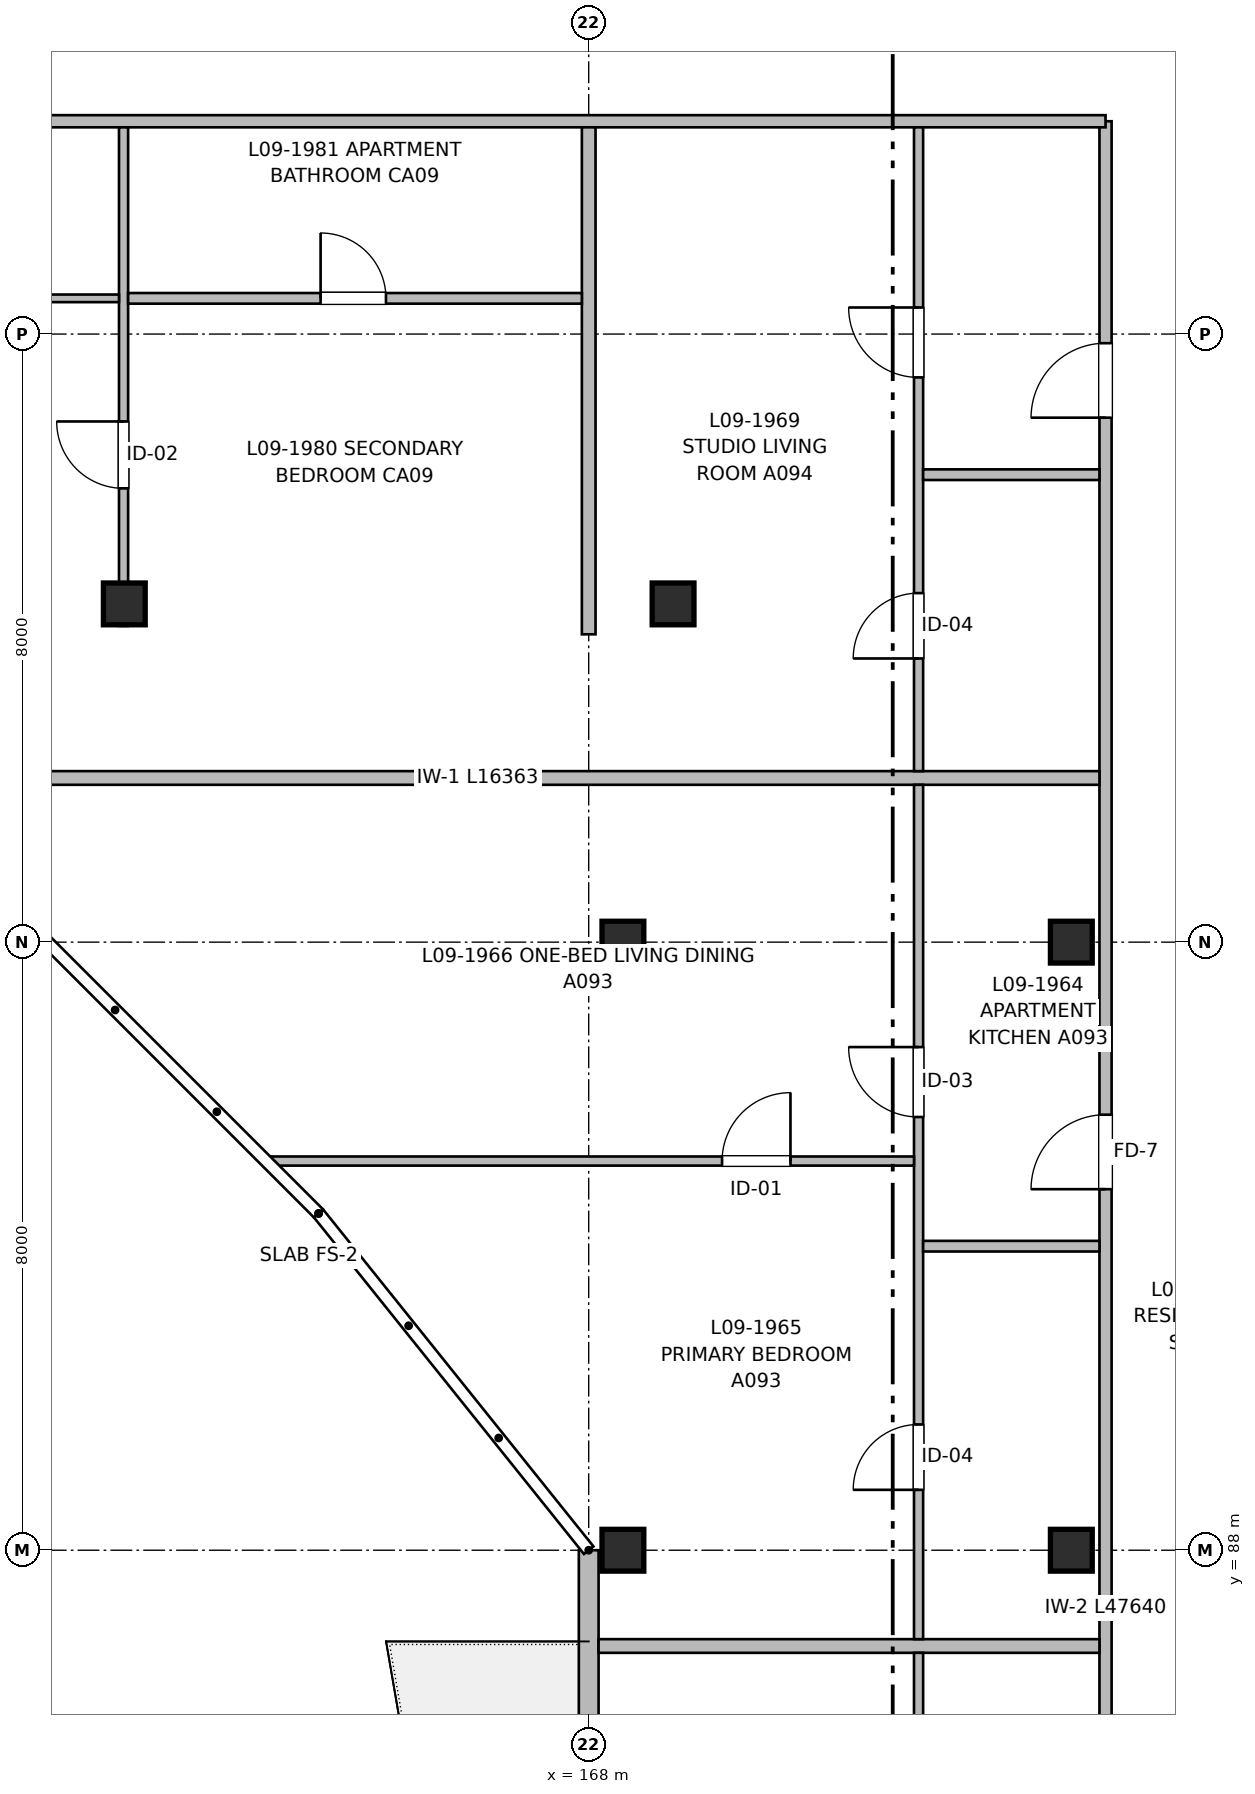
"""IFC4 building model, lengths in metres.
Left out: names, types, materials, properties, quantities, classifications, styles, units other than length and angle.
Written with IfcOpenShell. Run it as: python <this file> out.ifc"""

import sys

from ifc_helpers import new_model, si_unit, direction, frame, frame_2d, origin, origin_2d, place, context, subcontext, project, spatial, rectangle, extrude, element, fill, save


model = new_model("IFC4")
c1 = context("Model", 3, precision=1e-05, world=origin(), true_north=direction((0.0, 1.0)))
c2 = subcontext(c1, "Body", "Model", "MODEL_VIEW")
j1 = project(units=[si_unit("LENGTHUNIT", "METRE"), si_unit("PLANEANGLEUNIT", "RADIAN")], contexts=[c1])
p1 = place(None, origin())
s1 = spatial("IfcSite", under=j1, at=p1, CompositionType="ELEMENT")
p2 = place(p1, origin())
s2 = spatial("IfcBuilding", under=s1, at=p2, CompositionType="ELEMENT")
p3 = place(p2, frame((0.0, 0.0, 29.76)))
s3 = spatial("IfcBuildingStorey", under=s2, at=p3, CompositionType="ELEMENT", Elevation=29.76)
for number, where, z_axis, x_axis in (
    (1, (161.89, 100.45, 0.0), (0.0, 0.0, 1.0), (1.0, 0.0, 0.0)),
    (2, (168.45, 88.0, 0.0), (0.0, 0.0, 1.0), (1.0, 0.0, 0.0)),
    (3, (168.45, 96.0, 0.0), (0.0, 0.0, 1.0), (1.0, 0.0, 0.0)),
    (4, (169.11, 100.45, 0.0), (0.0, 0.0, 1.0), (1.0, 0.0, 0.0)),
    (5, (174.35, 88.0, 0.0), (0.0, 0.0, 1.0), (1.0, 0.0, 0.0)),
    (6, (174.35, 96.0, 0.0), (0.0, 0.0, 1.0), (1.0, 0.0, 0.0)),
):
    element("IfcColumn", number, at=place(p3, frame(where, z_axis=z_axis, x_axis=x_axis)), inside=s3, PredefinedType="COLUMN", context=c2, shape_type="SweptSolid", body=[
        extrude(rectangle(XDim=0.55, YDim=0.55, at=origin_2d()), origin(), (0.0, 0.0, 1.0), 3.2),
    ])
p4 = place(p3, frame((168.0, 59.0, 0.0), z_axis=(0.0, 0.0, 1.0), x_axis=(0.0, 1.0, 0.0)))
e7 = element("IfcWall", 7, at=p4, inside=s3, PredefinedType="SOLIDWALL", context=c2, shape_type="SweptSolid", body=[
    extrude(rectangle(XDim=29.0, YDim=0.26, at=frame_2d((14.5, 0.0))), origin(), (0.0, 0.0, 1.0), 2.98),
])
p5 = place(p4, frame((3.033, 0.0, 0.0)))
e8 = element("IfcOpeningElement", 8, at=p5, cuts=e7, PredefinedType="OPENING", context=c2, shape_type="SweptSolid", body=[
    extrude(rectangle(XDim=1.2, YDim=2.2, at=frame_2d((0.6, 1.1))), frame((0.0, 0.14, 0.0), z_axis=(0.0, -1.0, 0.0), x_axis=(1.0, 0.0, 0.0)), (0.0, 0.0, 1.0), 0.28),
])
p6 = place(p4, frame((6.133, 0.0, 0.77)))
e9 = element("IfcOpeningElement", 9, at=p6, cuts=e7, PredefinedType="OPENING", context=c2, shape_type="SweptSolid", body=[
    extrude(rectangle(XDim=1.65, YDim=1.45, at=frame_2d((0.825, 0.725))), frame((0.0, 0.14, 0.0), z_axis=(0.0, -1.0, 0.0), x_axis=(1.0, 0.0, 0.0)), (0.0, 0.0, 1.0), 0.28),
])
p7 = place(p4, frame((14.675, 0.0, 0.72)))
e10 = element("IfcOpeningElement", 10, at=p7, cuts=e7, PredefinedType="OPENING", context=c2, shape_type="SweptSolid", body=[
    extrude(rectangle(XDim=2.25, YDim=1.5, at=frame_2d((1.125, 0.75))), frame((0.0, 0.14, 0.0), z_axis=(0.0, -1.0, 0.0), x_axis=(1.0, 0.0, 0.0)), (0.0, 0.0, 1.0), 0.28),
])
p8 = place(p4, frame((24.092, 0.0, 0.9)))
e11 = element("IfcOpeningElement", 11, at=p8, cuts=e7, PredefinedType="OPENING", context=c2, shape_type="SweptSolid", body=[
    extrude(rectangle(XDim=1.05, YDim=1.15, at=frame_2d((0.525, 0.575))), frame((0.0, 0.14, 0.0), z_axis=(0.0, -1.0, 0.0), x_axis=(1.0, 0.0, 0.0)), (0.0, 0.0, 1.0), 0.28),
])
p9 = place(p4, frame((21.43, 0.0, 0.82)))
e12 = element("IfcOpeningElement", 12, at=p9, cuts=e7, PredefinedType="OPENING", context=c2, shape_type="SweptSolid", body=[
    extrude(rectangle(XDim=1.5, YDim=1.4, at=frame_2d((0.75, 0.7))), frame((0.0, 0.14, 0.0), z_axis=(0.0, -1.0, 0.0), x_axis=(1.0, 0.0, 0.0)), (0.0, 0.0, 1.0), 0.28),
])
p10 = place(p3, frame((174.8, 59.16, 0.0), z_axis=(0.0, 0.0, 1.0), x_axis=(0.0, 1.0, 0.0)))
e13 = element("IfcWall", 13, at=p10, inside=s3, PredefinedType="PARTITIONING", context=c2, shape_type="SweptSolid", body=[
    extrude(rectangle(XDim=47.64, YDim=0.16, at=frame_2d((23.82, 0.0))), origin(), (0.0, 0.0, 1.0), 2.935),
])
p11 = place(p10, frame((6.34, 0.0, 0.0)))
e14 = element("IfcOpeningElement", 14, at=p11, cuts=e13, PredefinedType="OPENING", context=c2, shape_type="SweptSolid", body=[
    extrude(rectangle(XDim=1.5, YDim=2.2, at=frame_2d((0.75, 1.1))), frame((0.0, 0.09, 0.0), z_axis=(0.0, -1.0, 0.0), x_axis=(1.0, 0.0, 0.0)), (0.0, 0.0, 1.0), 0.18),
])
p12 = place(p10, frame((21.55, 0.0, 0.0)))
e15 = element("IfcOpeningElement", 15, at=p12, cuts=e13, PredefinedType="OPENING", context=c2, shape_type="SweptSolid", body=[
    extrude(rectangle(XDim=1.02, YDim=2.15, at=frame_2d((0.51, 1.075))), frame((0.0, 0.09, 0.0), z_axis=(0.0, -1.0, 0.0), x_axis=(1.0, 0.0, 0.0)), (0.0, 0.0, 1.0), 0.18),
])
p13 = place(p10, frame((33.59, 0.0, 0.0)))
e16 = element("IfcOpeningElement", 16, at=p13, cuts=e13, PredefinedType="OPENING", context=c2, shape_type="SweptSolid", body=[
    extrude(rectangle(XDim=0.98, YDim=2.15, at=frame_2d((0.49, 1.075))), frame((0.0, 0.09, 0.0), z_axis=(0.0, -1.0, 0.0), x_axis=(1.0, 0.0, 0.0)), (0.0, 0.0, 1.0), 0.18),
])
p14 = place(p10, frame((43.74, 0.0, 0.0)))
e17 = element("IfcOpeningElement", 17, at=p14, cuts=e13, PredefinedType="OPENING", context=c2, shape_type="SweptSolid", body=[
    extrude(rectangle(XDim=0.98, YDim=2.15, at=frame_2d((0.49, 1.075))), frame((0.0, 0.09, 0.0), z_axis=(0.0, -1.0, 0.0), x_axis=(1.0, 0.0, 0.0)), (0.0, 0.0, 1.0), 0.18),
])
p15 = place(p3, frame((147.16, 106.8, 0.0), z_axis=(0.0, 0.0, 1.0), x_axis=(1.0, 0.0, 0.0)))
e18 = element("IfcWall", 18, at=p15, inside=s3, PredefinedType="PARTITIONING", context=c2, shape_type="SweptSolid", body=[
    extrude(rectangle(XDim=27.64, YDim=0.16, at=frame_2d((13.82, 0.0))), origin(), (0.0, 0.0, 1.0), 2.935),
])
p16 = place(p15, frame((3.515, 0.0, 0.0)))
e19 = element("IfcOpeningElement", 19, at=p16, cuts=e18, PredefinedType="OPENING", context=c2, shape_type="SweptSolid", body=[
    extrude(rectangle(XDim=1.05, YDim=2.15, at=frame_2d((0.525, 1.075))), frame((0.0, 0.09, 0.0), z_axis=(0.0, -1.0, 0.0), x_axis=(1.0, 0.0, 0.0)), (0.0, 0.0, 1.0), 0.18),
])
p17 = place(p15, frame((10.69, 0.0, 0.0)))
e20 = element("IfcOpeningElement", 20, at=p17, cuts=e18, PredefinedType="OPENING", context=c2, shape_type="SweptSolid", body=[
    extrude(rectangle(XDim=0.98, YDim=2.15, at=frame_2d((0.49, 1.075))), frame((0.0, 0.09, 0.0), z_axis=(0.0, -1.0, 0.0), x_axis=(1.0, 0.0, 0.0)), (0.0, 0.0, 1.0), 0.18),
])
p18 = place(p3, frame((168.0, 100.05, 0.0), z_axis=(0.0, 0.0, 1.0), x_axis=(0.0, 1.0, 0.0)))
e21 = element("IfcWall", 21, at=p18, inside=s3, PredefinedType="PARTITIONING", context=c2, shape_type="SweptSolid", body=[
    extrude(rectangle(XDim=6.67, YDim=0.18, at=frame_2d((3.335, 0.0))), origin(), (0.0, 0.0, 1.0), 2.935),
])
p19 = place(p3, frame((168.13, 86.74, 0.0), z_axis=(0.0, 0.0, 1.0), x_axis=(1.0, 0.0, 0.0)))
e22 = element("IfcWall", 22, at=p19, inside=s3, PredefinedType="PARTITIONING", context=c2, shape_type="SweptSolid", body=[
    extrude(rectangle(XDim=6.59, YDim=0.18, at=frame_2d((3.295, 0.0))), origin(), (0.0, 0.0, 1.0), 2.935),
])
p20 = place(p3, frame((158.357, 98.16, 0.0), z_axis=(0.0, 0.0, 1.0), x_axis=(1.0, 0.0, 0.0)))
e23 = element("IfcWall", 23, at=p20, inside=s3, PredefinedType="PARTITIONING", context=c2, shape_type="SweptSolid", body=[
    extrude(rectangle(XDim=16.363, YDim=0.18, at=frame_2d((8.181, 0.0))), origin(), (0.0, 0.0, 1.0), 2.935),
])
p21 = place(p3, frame((172.34, 73.52, 0.0), z_axis=(0.0, 0.0, 1.0), x_axis=(0.0, 1.0, 0.0)))
e24 = element("IfcWall", 24, at=p21, inside=s3, PredefinedType="PARTITIONING", context=c2, shape_type="SweptSolid", body=[
    extrude(rectangle(XDim=13.13, YDim=0.12, at=frame_2d((6.565, 0.0))), origin(), (0.0, 0.0, 1.0), 2.935),
])
p22 = place(p21, frame((2.295, 0.0, 0.0)))
e25 = element("IfcOpeningElement", 25, at=p22, cuts=e24, PredefinedType="OPENING", context=c2, shape_type="SweptSolid", body=[
    extrude(rectangle(XDim=0.94, YDim=2.1, at=frame_2d((0.47, 1.05))), frame((0.0, 0.07, 0.0), z_axis=(0.0, -1.0, 0.0), x_axis=(1.0, 0.0, 0.0)), (0.0, 0.0, 1.0), 0.14),
])
p23 = place(p21, frame((8.025, 0.0, 0.0)))
e26 = element("IfcOpeningElement", 26, at=p23, cuts=e24, PredefinedType="OPENING", context=c2, shape_type="SweptSolid", body=[
    extrude(rectangle(XDim=0.92, YDim=2.1, at=frame_2d((0.46, 1.05))), frame((0.0, 0.07, 0.0), z_axis=(0.0, -1.0, 0.0), x_axis=(1.0, 0.0, 0.0)), (0.0, 0.0, 1.0), 0.14),
])
p24 = place(p3, frame((172.34, 86.83, 0.0), z_axis=(0.0, 0.0, 1.0), x_axis=(0.0, 1.0, 0.0)))
e27 = element("IfcWall", 27, at=p24, inside=s3, PredefinedType="PARTITIONING", context=c2, shape_type="SweptSolid", body=[
    extrude(rectangle(XDim=11.24, YDim=0.12, at=frame_2d((5.62, 0.0))), origin(), (0.0, 0.0, 1.0), 2.935),
])
p25 = place(p24, frame((1.965, 0.0, 0.0)))
e28 = element("IfcOpeningElement", 28, at=p25, cuts=e27, PredefinedType="OPENING", context=c2, shape_type="SweptSolid", body=[
    extrude(rectangle(XDim=0.86, YDim=2.1, at=frame_2d((0.43, 1.05))), frame((0.0, 0.07, 0.0), z_axis=(0.0, -1.0, 0.0), x_axis=(1.0, 0.0, 0.0)), (0.0, 0.0, 1.0), 0.14),
])
p26 = place(p24, frame((6.87, 0.0, 0.0)))
e29 = element("IfcOpeningElement", 29, at=p26, cuts=e27, PredefinedType="OPENING", context=c2, shape_type="SweptSolid", body=[
    extrude(rectangle(XDim=0.92, YDim=2.1, at=frame_2d((0.46, 1.05))), frame((0.0, 0.07, 0.0), z_axis=(0.0, -1.0, 0.0), x_axis=(1.0, 0.0, 0.0)), (0.0, 0.0, 1.0), 0.14),
])
p27 = place(p3, frame((172.4, 92.0, 0.0), z_axis=(0.0, 0.0, 1.0), x_axis=(1.0, 0.0, 0.0)))
e30 = element("IfcWall", 30, at=p27, inside=s3, PredefinedType="PARTITIONING", context=c2, shape_type="SweptSolid", body=[
    extrude(rectangle(XDim=2.32, YDim=0.14, at=frame_2d((1.16, 0.0))), origin(), (0.0, 0.0, 1.0), 2.935),
])
p28 = place(p3, frame((163.812, 93.12, 0.0), z_axis=(0.0, 0.0, 1.0), x_axis=(1.0, 0.0, 0.0)))
e31 = element("IfcWall", 31, at=p28, inside=s3, PredefinedType="PARTITIONING", context=c2, shape_type="SweptSolid", body=[
    extrude(rectangle(XDim=8.468, YDim=0.12, at=frame_2d((4.234, 0.0))), origin(), (0.0, 0.0, 1.0), 2.935),
])
p29 = place(p28, frame((5.942, 0.0, 0.0)))
e32 = element("IfcOpeningElement", 32, at=p29, cuts=e31, PredefinedType="OPENING", context=c2, shape_type="SweptSolid", body=[
    extrude(rectangle(XDim=0.9, YDim=2.1, at=frame_2d((0.45, 1.05))), frame((0.0, 0.07, 0.0), z_axis=(0.0, -1.0, 0.0), x_axis=(1.0, 0.0, 0.0)), (0.0, 0.0, 1.0), 0.14),
])
p30 = place(p3, frame((172.34, 98.25, 0.0), z_axis=(0.0, 0.0, 1.0), x_axis=(0.0, 1.0, 0.0)))
e33 = element("IfcWall", 33, at=p30, inside=s3, PredefinedType="PARTITIONING", context=c2, shape_type="SweptSolid", body=[
    extrude(rectangle(XDim=8.47, YDim=0.12, at=frame_2d((4.235, 0.0))), origin(), (0.0, 0.0, 1.0), 2.935),
])
p31 = place(p30, frame((1.482, 0.0, 0.0)))
e34 = element("IfcOpeningElement", 34, at=p31, cuts=e33, PredefinedType="OPENING", context=c2, shape_type="SweptSolid", body=[
    extrude(rectangle(XDim=0.86, YDim=2.1, at=frame_2d((0.43, 1.05))), frame((0.0, 0.07, 0.0), z_axis=(0.0, -1.0, 0.0), x_axis=(1.0, 0.0, 0.0)), (0.0, 0.0, 1.0), 0.14),
])
p32 = place(p30, frame((5.18, 0.0, 0.0)))
e35 = element("IfcOpeningElement", 35, at=p32, cuts=e33, PredefinedType="OPENING", context=c2, shape_type="SweptSolid", body=[
    extrude(rectangle(XDim=0.92, YDim=2.1, at=frame_2d((0.46, 1.05))), frame((0.0, 0.07, 0.0), z_axis=(0.0, -1.0, 0.0), x_axis=(1.0, 0.0, 0.0)), (0.0, 0.0, 1.0), 0.14),
])
p33 = place(p3, frame((172.4, 102.15, 0.0), z_axis=(0.0, 0.0, 1.0), x_axis=(1.0, 0.0, 0.0)))
e36 = element("IfcWall", 36, at=p33, inside=s3, PredefinedType="PARTITIONING", context=c2, shape_type="SweptSolid", body=[
    extrude(rectangle(XDim=2.32, YDim=0.14, at=frame_2d((1.16, 0.0))), origin(), (0.0, 0.0, 1.0), 2.935),
])
p34 = place(p3, frame((161.88, 100.16, 0.0), z_axis=(0.0, 0.0, 1.0), x_axis=(0.0, 1.0, 0.0)))
e37 = element("IfcWall", 37, at=p34, inside=s3, PredefinedType="PARTITIONING", context=c2, shape_type="SweptSolid", body=[
    extrude(rectangle(XDim=6.56, YDim=0.12, at=frame_2d((3.28, 0.0))), origin(), (0.0, 0.0, 1.0), 2.68),
])
p35 = place(p34, frame((1.81, 0.0, 0.0)))
e38 = element("IfcOpeningElement", 38, at=p35, cuts=e37, PredefinedType="OPENING", context=c2, shape_type="SweptSolid", body=[
    extrude(rectangle(XDim=0.88, YDim=2.1, at=frame_2d((0.44, 1.05))), frame((0.0, 0.07, 0.0), z_axis=(0.0, -1.0, 0.0), x_axis=(1.0, 0.0, 0.0)), (0.0, 0.0, 1.0), 0.14),
])
p36 = place(p3, frame((161.94, 104.47, 0.0), z_axis=(0.0, 0.0, 1.0), x_axis=(1.0, 0.0, 0.0)))
e39 = element("IfcWall", 39, at=p36, inside=s3, PredefinedType="PARTITIONING", context=c2, shape_type="SweptSolid", body=[
    extrude(rectangle(XDim=5.97, YDim=0.14, at=frame_2d((2.985, 0.0))), origin(), (0.0, 0.0, 1.0), 2.935),
])
p37 = place(p36, frame((2.533, 0.0, 0.0)))
e40 = element("IfcOpeningElement", 40, at=p37, cuts=e39, PredefinedType="OPENING", context=c2, shape_type="SweptSolid", body=[
    extrude(rectangle(XDim=0.86, YDim=2.1, at=frame_2d((0.43, 1.05))), frame((0.0, 0.08, 0.0), z_axis=(0.0, -1.0, 0.0), x_axis=(1.0, 0.0, 0.0)), (0.0, 0.0, 1.0), 0.16),
])
p38 = place(p3, frame((154.8, 104.47, 0.0), z_axis=(0.0, 0.0, 1.0), x_axis=(1.0, 0.0, 0.0)))
e41 = element("IfcWall", 41, at=p38, inside=s3, PredefinedType="PARTITIONING", context=c2, shape_type="SweptSolid", body=[
    extrude(rectangle(XDim=7.02, YDim=0.1, at=frame_2d((3.51, 0.0))), origin(), (0.0, 0.0, 1.0), 2.935),
])
p39 = place(p38, frame((2.974, 0.0, 0.0)))
e42 = element("IfcOpeningElement", 42, at=p39, cuts=e41, PredefinedType="OPENING", context=c2, shape_type="SweptSolid", body=[
    extrude(rectangle(XDim=0.92, YDim=2.1, at=frame_2d((0.46, 1.05))), frame((0.0, 0.06, 0.0), z_axis=(0.0, -1.0, 0.0), x_axis=(1.0, 0.0, 0.0)), (0.0, 0.0, 1.0), 0.12),
])
p40 = place(p25, origin())
e43 = element("IfcDoor", 43, at=p40, inside=s3, OperationType="SINGLE_SWING_LEFT", PredefinedType="DOOR", context=c2, shape_type="SweptSolid", body=[
    extrude(rectangle(XDim=0.86, YDim=2.1, at=frame_2d((0.43, 1.05))), frame((0.0, 0.025, 0.0), z_axis=(0.0, -1.0, 0.0), x_axis=(1.0, 0.0, 0.0)), (0.0, 0.0, 1.0), 0.05),
])
fill(e28, e43)
p41 = place(p26, origin())
e44 = element("IfcDoor", 44, at=p41, inside=s3, OperationType="SINGLE_SWING_RIGHT", PredefinedType="DOOR", context=c2, shape_type="SweptSolid", body=[
    extrude(rectangle(XDim=0.92, YDim=2.1, at=frame_2d((0.46, 1.05))), frame((0.0, 0.025, 0.0), z_axis=(0.0, -1.0, 0.0), x_axis=(1.0, 0.0, 0.0)), (0.0, 0.0, 1.0), 0.05),
])
fill(e29, e44)
p42 = place(p13, origin())
e45 = element("IfcDoor", 45, at=p42, inside=s3, OperationType="SINGLE_SWING_LEFT", PredefinedType="DOOR", context=c2, shape_type="SweptSolid", body=[
    extrude(rectangle(XDim=0.98, YDim=2.15, at=frame_2d((0.49, 1.075))), frame((0.0, 0.025, 0.0), z_axis=(0.0, -1.0, 0.0), x_axis=(1.0, 0.0, 0.0)), (0.0, 0.0, 1.0), 0.05),
])
fill(e16, e45)
p43 = place(p29, origin())
e46 = element("IfcDoor", 46, at=p43, inside=s3, OperationType="SINGLE_SWING_RIGHT", PredefinedType="DOOR", context=c2, shape_type="SweptSolid", body=[
    extrude(rectangle(XDim=0.9, YDim=2.1, at=frame_2d((0.45, 1.05))), frame((0.0, 0.025, 0.0), z_axis=(0.0, -1.0, 0.0), x_axis=(1.0, 0.0, 0.0)), (0.0, 0.0, 1.0), 0.05),
])
fill(e32, e46)
p44 = place(p31, origin())
e47 = element("IfcDoor", 47, at=p44, inside=s3, OperationType="SINGLE_SWING_LEFT", PredefinedType="DOOR", context=c2, shape_type="SweptSolid", body=[
    extrude(rectangle(XDim=0.86, YDim=2.1, at=frame_2d((0.43, 1.05))), frame((0.0, 0.025, 0.0), z_axis=(0.0, -1.0, 0.0), x_axis=(1.0, 0.0, 0.0)), (0.0, 0.0, 1.0), 0.05),
])
fill(e34, e47)
p45 = place(p32, origin())
e48 = element("IfcDoor", 48, at=p45, inside=s3, OperationType="SINGLE_SWING_RIGHT", PredefinedType="DOOR", context=c2, shape_type="SweptSolid", body=[
    extrude(rectangle(XDim=0.92, YDim=2.1, at=frame_2d((0.46, 1.05))), frame((0.0, 0.025, 0.0), z_axis=(0.0, -1.0, 0.0), x_axis=(1.0, 0.0, 0.0)), (0.0, 0.0, 1.0), 0.05),
])
fill(e35, e48)
p46 = place(p14, origin())
e49 = element("IfcDoor", 49, at=p46, inside=s3, OperationType="SINGLE_SWING_LEFT", PredefinedType="DOOR", context=c2, shape_type="SweptSolid", body=[
    extrude(rectangle(XDim=0.98, YDim=2.15, at=frame_2d((0.49, 1.075))), frame((0.0, 0.025, 0.0), z_axis=(0.0, -1.0, 0.0), x_axis=(1.0, 0.0, 0.0)), (0.0, 0.0, 1.0), 0.05),
])
fill(e17, e49)
p47 = place(p35, origin())
e50 = element("IfcDoor", 50, at=p47, inside=s3, OperationType="SINGLE_SWING_RIGHT", PredefinedType="DOOR", context=c2, shape_type="SweptSolid", body=[
    extrude(rectangle(XDim=0.88, YDim=2.1, at=frame_2d((0.44, 1.05))), frame((0.0, 0.025, 0.0), z_axis=(0.0, -1.0, 0.0), x_axis=(1.0, 0.0, 0.0)), (0.0, 0.0, 1.0), 0.05),
])
fill(e38, e50)
p48 = place(p37, origin())
e51 = element("IfcDoor", 51, at=p48, inside=s3, OperationType="SINGLE_SWING_LEFT", PredefinedType="DOOR", context=c2, shape_type="SweptSolid", body=[
    extrude(rectangle(XDim=0.86, YDim=2.1, at=frame_2d((0.43, 1.05))), frame((0.0, 0.025, 0.0), z_axis=(0.0, -1.0, 0.0), x_axis=(1.0, 0.0, 0.0)), (0.0, 0.0, 1.0), 0.05),
])
fill(e40, e51)
save(model, sys.argv[1])
